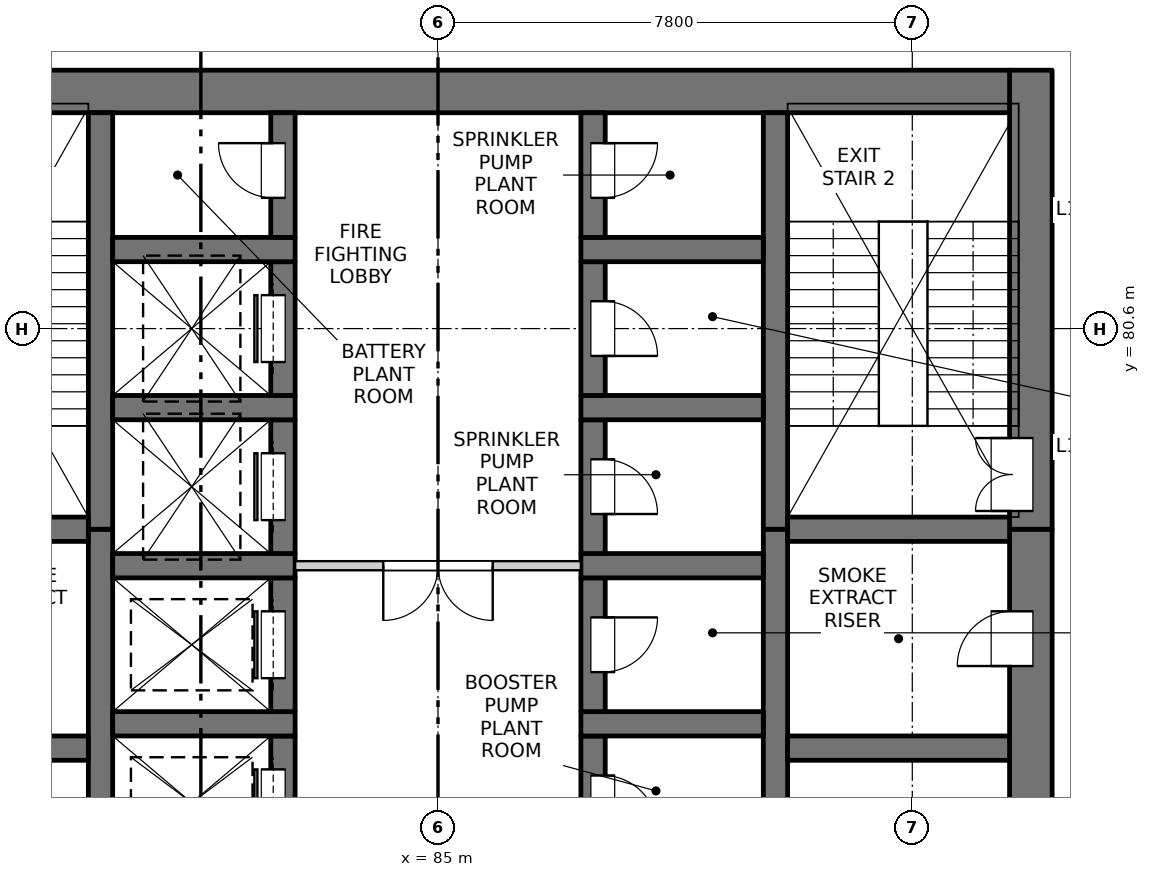
"""IFC4 building model, lengths in metres.
Left out: names, types, materials, properties, quantities, classifications, styles, units other than length and angle.
Written with IfcOpenShell. Run it as: python <this file> out.ifc"""

import sys

from ifc_helpers import new_model, si_unit, direction, frame, frame_2d, origin, place, context, subcontext, project, spatial, rectangle, extrude, element, fill, save


model = new_model("IFC4")
c1 = context("Model", 3, precision=1e-05, world=origin(), true_north=direction((0.0, 1.0)))
c2 = subcontext(c1, "Body", "Model", "MODEL_VIEW")
j1 = project(units=[si_unit("LENGTHUNIT", "METRE"), si_unit("PLANEANGLEUNIT", "RADIAN")], contexts=[c1])
p1 = place(None, origin())
s1 = spatial("IfcSite", under=j1, at=p1, CompositionType="ELEMENT")
p2 = place(p1, origin())
s2 = spatial("IfcBuilding", under=s1, at=p2, CompositionType="ELEMENT")
p3 = place(p2, frame((0.0, 0.0, 46.7)))
s3 = spatial("IfcBuildingStorey", under=s2, at=p3, CompositionType="ELEMENT", Elevation=46.7)
p4 = place(p3, frame((94.75, 61.95, -0.3), z_axis=(0.0, 0.0, 1.0), x_axis=(0.0, 1.0, 0.0)))
e1 = element("IfcWall", 1, at=p4, inside=s3, PredefinedType="SOLIDWALL", context=c2, shape_type="SweptSolid", body=[
    extrude(rectangle(XDim=15.35, YDim=0.7, at=frame_2d((7.675, 0.0))), origin(), (0.0, 0.0, 1.0), 4.5),
])
p5 = place(p4, frame((0.925, 0.0, 0.3)))
e2 = element("IfcOpeningElement", 2, at=p5, cuts=e1, PredefinedType="OPENING", context=c2, shape_type="SweptSolid", body=[
    extrude(rectangle(XDim=0.9, YDim=2.1, at=frame_2d((0.45, 1.05))), frame((0.0, 0.36, 0.0), z_axis=(0.0, -1.0, 0.0), x_axis=(1.0, 0.0, 0.0)), (0.0, 0.0, 1.0), 0.72),
])
p6 = place(p4, frame((3.8, 0.0, 0.3)))
e3 = element("IfcOpeningElement", 3, at=p6, cuts=e1, PredefinedType="OPENING", context=c2, shape_type="SweptSolid", body=[
    extrude(rectangle(XDim=0.9, YDim=2.1, at=frame_2d((0.45, 1.05))), frame((0.0, 0.36, 0.0), z_axis=(0.0, -1.0, 0.0), x_axis=(1.0, 0.0, 0.0)), (0.0, 0.0, 1.0), 0.72),
])
p7 = place(p4, frame((8.3, 0.0, 0.3)))
e4 = element("IfcOpeningElement", 4, at=p7, cuts=e1, PredefinedType="OPENING", context=c2, shape_type="SweptSolid", body=[
    extrude(rectangle(XDim=0.9, YDim=2.1, at=frame_2d((0.45, 1.05))), frame((0.0, 0.36, 0.0), z_axis=(0.0, -1.0, 0.0), x_axis=(1.0, 0.0, 0.0)), (0.0, 0.0, 1.0), 0.72),
])
p8 = place(p4, frame((13.1, 0.0, 0.3)))
e5 = element("IfcOpeningElement", 5, at=p8, cuts=e1, PredefinedType="OPENING", context=c2, shape_type="SweptSolid", body=[
    extrude(rectangle(XDim=0.9, YDim=2.1, at=frame_2d((0.45, 1.05))), frame((0.0, 0.36, 0.0), z_axis=(0.0, -1.0, 0.0), x_axis=(1.0, 0.0, 0.0)), (0.0, 0.0, 1.0), 0.72),
])
p9 = place(p3, frame((94.75, 77.3, -0.3), z_axis=(0.0, 0.0, 1.0), x_axis=(0.0, 1.0, 0.0)))
e6 = element("IfcWall", 6, at=p9, inside=s3, PredefinedType="SOLIDWALL", context=c2, shape_type="SweptSolid", body=[
    extrude(rectangle(XDim=7.55, YDim=0.7, at=frame_2d((3.775, 0.0))), origin(), (0.0, 0.0, 1.0), 4.5),
])
p10 = place(p9, frame((0.3, 0.0, 0.3)))
e7 = element("IfcOpeningElement", 7, at=p10, cuts=e6, PredefinedType="OPENING", context=c2, shape_type="SweptSolid", body=[
    extrude(rectangle(XDim=1.2, YDim=2.1, at=frame_2d((0.6, 1.05))), frame((0.0, 0.36, 0.0), z_axis=(0.0, -1.0, 0.0), x_axis=(1.0, 0.0, 0.0)), (0.0, 0.0, 1.0), 0.72),
])
p11 = place(p3, frame((75.6, 84.5, -0.3), z_axis=(0.0, 0.0, 1.0), x_axis=(1.0, 0.0, 0.0)))
e8 = element("IfcWall", 8, at=p11, inside=s3, PredefinedType="SOLIDWALL", context=c2, shape_type="SweptSolid", body=[
    extrude(rectangle(XDim=18.8, YDim=0.7, at=frame_2d((9.4, 0.0))), origin(), (0.0, 0.0, 1.0), 4.5),
])
p12 = place(p3, frame((79.45, 60.9, -0.3), z_axis=(0.0, 0.0, 1.0), x_axis=(0.0, 1.0, 0.0)))
e9 = element("IfcWall", 9, at=p12, inside=s3, PredefinedType="SOLIDWALL", context=c2, shape_type="SweptSolid", body=[
    extrude(rectangle(XDim=16.4, YDim=0.4, at=frame_2d((8.2, 0.0))), origin(), (0.0, 0.0, 1.0), 4.5),
])
p13 = place(p3, frame((79.45, 77.3, -0.3), z_axis=(0.0, 0.0, 1.0), x_axis=(0.0, 1.0, 0.0)))
e10 = element("IfcWall", 10, at=p13, inside=s3, PredefinedType="SOLIDWALL", context=c2, shape_type="SweptSolid", body=[
    extrude(rectangle(XDim=6.85, YDim=0.4, at=frame_2d((3.425, 0.0))), origin(), (0.0, 0.0, 1.0), 4.5),
])
p14 = place(p3, frame((90.55, 61.95, -0.3), z_axis=(0.0, 0.0, 1.0), x_axis=(0.0, 1.0, 0.0)))
e11 = element("IfcWall", 11, at=p14, inside=s3, PredefinedType="SOLIDWALL", context=c2, shape_type="SweptSolid", body=[
    extrude(rectangle(XDim=15.35, YDim=0.4, at=frame_2d((7.675, 0.0))), origin(), (0.0, 0.0, 1.0), 4.5),
])
p15 = place(p3, frame((90.55, 77.3, -0.3), z_axis=(0.0, 0.0, 1.0), x_axis=(0.0, 1.0, 0.0)))
e12 = element("IfcWall", 12, at=p15, inside=s3, PredefinedType="SOLIDWALL", context=c2, shape_type="SweptSolid", body=[
    extrude(rectangle(XDim=6.85, YDim=0.4, at=frame_2d((3.425, 0.0))), origin(), (0.0, 0.0, 1.0), 4.5),
])
p16 = place(p3, frame((82.45, 71.7, -0.3), z_axis=(0.0, 0.0, 1.0), x_axis=(0.0, 1.0, 0.0)))
e13 = element("IfcWall", 13, at=p16, inside=s3, PredefinedType="SOLIDWALL", context=c2, shape_type="SweptSolid", body=[
    extrude(rectangle(XDim=2.2, YDim=0.4, at=frame_2d((1.1, 0.0))), origin(), (0.0, 0.0, 1.0), 4.5),
])
p17 = place(p16, frame((0.55, 0.0, 0.3)))
e14 = element("IfcOpeningElement", 14, at=p17, cuts=e13, PredefinedType="OPENING", context=c2, shape_type="SweptSolid", body=[
    extrude(rectangle(XDim=1.1, YDim=2.1, at=frame_2d((0.55, 1.05))), frame((0.0, 0.21, 0.0), z_axis=(0.0, -1.0, 0.0), x_axis=(1.0, 0.0, 0.0)), (0.0, 0.0, 1.0), 0.42),
])
p18 = place(p3, frame((79.65, 74.1, -0.3), z_axis=(0.0, 0.0, 1.0), x_axis=(1.0, 0.0, 0.0)))
e15 = element("IfcWall", 15, at=p18, inside=s3, PredefinedType="SOLIDWALL", context=c2, shape_type="SweptSolid", body=[
    extrude(rectangle(XDim=3.0, YDim=0.4, at=frame_2d((1.5, 0.0))), origin(), (0.0, 0.0, 1.0), 4.5),
])
p19 = place(p3, frame((82.45, 74.3, -0.3), z_axis=(0.0, 0.0, 1.0), x_axis=(0.0, 1.0, 0.0)))
e16 = element("IfcWall", 16, at=p19, inside=s3, PredefinedType="SOLIDWALL", context=c2, shape_type="SweptSolid", body=[
    extrude(rectangle(XDim=2.2, YDim=0.4, at=frame_2d((1.1, 0.0))), origin(), (0.0, 0.0, 1.0), 4.5),
])
p20 = place(p19, frame((0.55, 0.0, 0.3)))
e17 = element("IfcOpeningElement", 17, at=p20, cuts=e16, PredefinedType="OPENING", context=c2, shape_type="SweptSolid", body=[
    extrude(rectangle(XDim=1.1, YDim=2.1, at=frame_2d((0.55, 1.05))), frame((0.0, 0.21, 0.0), z_axis=(0.0, -1.0, 0.0), x_axis=(1.0, 0.0, 0.0)), (0.0, 0.0, 1.0), 0.42),
])
p21 = place(p3, frame((79.65, 76.7, -0.3), z_axis=(0.0, 0.0, 1.0), x_axis=(1.0, 0.0, 0.0)))
e18 = element("IfcWall", 18, at=p21, inside=s3, PredefinedType="SOLIDWALL", context=c2, shape_type="SweptSolid", body=[
    extrude(rectangle(XDim=3.0, YDim=0.4, at=frame_2d((1.5, 0.0))), origin(), (0.0, 0.0, 1.0), 4.5),
])
p22 = place(p3, frame((82.45, 76.9, -0.3), z_axis=(0.0, 0.0, 1.0), x_axis=(0.0, 1.0, 0.0)))
e19 = element("IfcWall", 19, at=p22, inside=s3, PredefinedType="SOLIDWALL", context=c2, shape_type="SweptSolid", body=[
    extrude(rectangle(XDim=2.2, YDim=0.4, at=frame_2d((1.1, 0.0))), origin(), (0.0, 0.0, 1.0), 4.5),
])
p23 = place(p22, frame((0.55, 0.0, 0.3)))
e20 = element("IfcOpeningElement", 20, at=p23, cuts=e19, PredefinedType="OPENING", context=c2, shape_type="SweptSolid", body=[
    extrude(rectangle(XDim=1.1, YDim=2.1, at=frame_2d((0.55, 1.05))), frame((0.0, 0.21, 0.0), z_axis=(0.0, -1.0, 0.0), x_axis=(1.0, 0.0, 0.0)), (0.0, 0.0, 1.0), 0.42),
])
p24 = place(p3, frame((79.65, 79.3, -0.3), z_axis=(0.0, 0.0, 1.0), x_axis=(1.0, 0.0, 0.0)))
e21 = element("IfcWall", 21, at=p24, inside=s3, PredefinedType="SOLIDWALL", context=c2, shape_type="SweptSolid", body=[
    extrude(rectangle(XDim=3.0, YDim=0.4, at=frame_2d((1.5, 0.0))), origin(), (0.0, 0.0, 1.0), 4.5),
])
p25 = place(p3, frame((82.45, 79.5, -0.3), z_axis=(0.0, 0.0, 1.0), x_axis=(0.0, 1.0, 0.0)))
e22 = element("IfcWall", 22, at=p25, inside=s3, PredefinedType="SOLIDWALL", context=c2, shape_type="SweptSolid", body=[
    extrude(rectangle(XDim=2.2, YDim=0.4, at=frame_2d((1.1, 0.0))), origin(), (0.0, 0.0, 1.0), 4.5),
])
p26 = place(p25, frame((0.55, 0.0, 0.3)))
e23 = element("IfcOpeningElement", 23, at=p26, cuts=e22, PredefinedType="OPENING", context=c2, shape_type="SweptSolid", body=[
    extrude(rectangle(XDim=1.1, YDim=2.1, at=frame_2d((0.55, 1.05))), frame((0.0, 0.21, 0.0), z_axis=(0.0, -1.0, 0.0), x_axis=(1.0, 0.0, 0.0)), (0.0, 0.0, 1.0), 0.42),
])
p27 = place(p3, frame((79.65, 81.9, -0.3), z_axis=(0.0, 0.0, 1.0), x_axis=(1.0, 0.0, 0.0)))
e24 = element("IfcWall", 24, at=p27, inside=s3, PredefinedType="SOLIDWALL", context=c2, shape_type="SweptSolid", body=[
    extrude(rectangle(XDim=3.0, YDim=0.4, at=frame_2d((1.5, 0.0))), origin(), (0.0, 0.0, 1.0), 4.5),
])
p28 = place(p3, frame((82.45, 82.1, -0.3), z_axis=(0.0, 0.0, 1.0), x_axis=(0.0, 1.0, 0.0)))
e25 = element("IfcWall", 25, at=p28, inside=s3, PredefinedType="SOLIDWALL", context=c2, shape_type="SweptSolid", body=[
    extrude(rectangle(XDim=2.05, YDim=0.4, at=frame_2d((1.025, 0.0))), origin(), (0.0, 0.0, 1.0), 4.5),
])
p29 = place(p28, frame((0.65, 0.0, 0.3)))
e26 = element("IfcOpeningElement", 26, at=p29, cuts=e25, PredefinedType="OPENING", context=c2, shape_type="SweptSolid", body=[
    extrude(rectangle(XDim=0.9, YDim=2.1, at=frame_2d((0.45, 1.05))), frame((0.0, 0.21, 0.0), z_axis=(0.0, -1.0, 0.0), x_axis=(1.0, 0.0, 0.0)), (0.0, 0.0, 1.0), 0.42),
])
p30 = place(p3, frame((87.55, 71.7, -0.3), z_axis=(0.0, 0.0, 1.0), x_axis=(0.0, 1.0, 0.0)))
e27 = element("IfcWall", 27, at=p30, inside=s3, PredefinedType="SOLIDWALL", context=c2, shape_type="SweptSolid", body=[
    extrude(rectangle(XDim=2.2, YDim=0.4, at=frame_2d((1.1, 0.0))), origin(), (0.0, 0.0, 1.0), 4.5),
])
p31 = place(p30, frame((0.65, 0.0, 0.3)))
e28 = element("IfcOpeningElement", 28, at=p31, cuts=e27, PredefinedType="OPENING", context=c2, shape_type="SweptSolid", body=[
    extrude(rectangle(XDim=0.9, YDim=2.1, at=frame_2d((0.45, 1.05))), frame((0.0, 0.21, 0.0), z_axis=(0.0, -1.0, 0.0), x_axis=(1.0, 0.0, 0.0)), (0.0, 0.0, 1.0), 0.42),
])
p32 = place(p3, frame((87.35, 74.1, -0.3), z_axis=(0.0, 0.0, 1.0), x_axis=(1.0, 0.0, 0.0)))
e29 = element("IfcWall", 29, at=p32, inside=s3, PredefinedType="SOLIDWALL", context=c2, shape_type="SweptSolid", body=[
    extrude(rectangle(XDim=3.0, YDim=0.4, at=frame_2d((1.5, 0.0))), origin(), (0.0, 0.0, 1.0), 4.5),
])
p33 = place(p3, frame((87.55, 74.3, -0.3), z_axis=(0.0, 0.0, 1.0), x_axis=(0.0, 1.0, 0.0)))
e30 = element("IfcWall", 30, at=p33, inside=s3, PredefinedType="SOLIDWALL", context=c2, shape_type="SweptSolid", body=[
    extrude(rectangle(XDim=2.2, YDim=0.4, at=frame_2d((1.1, 0.0))), origin(), (0.0, 0.0, 1.0), 4.5),
])
p34 = place(p33, frame((0.65, 0.0, 0.3)))
e31 = element("IfcOpeningElement", 31, at=p34, cuts=e30, PredefinedType="OPENING", context=c2, shape_type="SweptSolid", body=[
    extrude(rectangle(XDim=0.9, YDim=2.1, at=frame_2d((0.45, 1.05))), frame((0.0, 0.21, 0.0), z_axis=(0.0, -1.0, 0.0), x_axis=(1.0, 0.0, 0.0)), (0.0, 0.0, 1.0), 0.42),
])
p35 = place(p3, frame((87.35, 76.7, -0.3), z_axis=(0.0, 0.0, 1.0), x_axis=(1.0, 0.0, 0.0)))
e32 = element("IfcWall", 32, at=p35, inside=s3, PredefinedType="SOLIDWALL", context=c2, shape_type="SweptSolid", body=[
    extrude(rectangle(XDim=3.0, YDim=0.4, at=frame_2d((1.5, 0.0))), origin(), (0.0, 0.0, 1.0), 4.5),
])
p36 = place(p3, frame((87.55, 76.9, -0.3), z_axis=(0.0, 0.0, 1.0), x_axis=(0.0, 1.0, 0.0)))
e33 = element("IfcWall", 33, at=p36, inside=s3, PredefinedType="SOLIDWALL", context=c2, shape_type="SweptSolid", body=[
    extrude(rectangle(XDim=2.2, YDim=0.4, at=frame_2d((1.1, 0.0))), origin(), (0.0, 0.0, 1.0), 4.5),
])
p37 = place(p36, frame((0.65, 0.0, 0.3)))
e34 = element("IfcOpeningElement", 34, at=p37, cuts=e33, PredefinedType="OPENING", context=c2, shape_type="SweptSolid", body=[
    extrude(rectangle(XDim=0.9, YDim=2.1, at=frame_2d((0.45, 1.05))), frame((0.0, 0.21, 0.0), z_axis=(0.0, -1.0, 0.0), x_axis=(1.0, 0.0, 0.0)), (0.0, 0.0, 1.0), 0.42),
])
p38 = place(p3, frame((87.35, 79.3, -0.3), z_axis=(0.0, 0.0, 1.0), x_axis=(1.0, 0.0, 0.0)))
e35 = element("IfcWall", 35, at=p38, inside=s3, PredefinedType="SOLIDWALL", context=c2, shape_type="SweptSolid", body=[
    extrude(rectangle(XDim=3.0, YDim=0.4, at=frame_2d((1.5, 0.0))), origin(), (0.0, 0.0, 1.0), 4.5),
])
p39 = place(p3, frame((87.55, 79.5, -0.3), z_axis=(0.0, 0.0, 1.0), x_axis=(0.0, 1.0, 0.0)))
e36 = element("IfcWall", 36, at=p39, inside=s3, PredefinedType="SOLIDWALL", context=c2, shape_type="SweptSolid", body=[
    extrude(rectangle(XDim=2.2, YDim=0.4, at=frame_2d((1.1, 0.0))), origin(), (0.0, 0.0, 1.0), 4.5),
])
p40 = place(p39, frame((0.65, 0.0, 0.3)))
e37 = element("IfcOpeningElement", 37, at=p40, cuts=e36, PredefinedType="OPENING", context=c2, shape_type="SweptSolid", body=[
    extrude(rectangle(XDim=0.9, YDim=2.1, at=frame_2d((0.45, 1.05))), frame((0.0, 0.21, 0.0), z_axis=(0.0, -1.0, 0.0), x_axis=(1.0, 0.0, 0.0)), (0.0, 0.0, 1.0), 0.42),
])
p41 = place(p3, frame((87.35, 81.9, -0.3), z_axis=(0.0, 0.0, 1.0), x_axis=(1.0, 0.0, 0.0)))
e38 = element("IfcWall", 38, at=p41, inside=s3, PredefinedType="SOLIDWALL", context=c2, shape_type="SweptSolid", body=[
    extrude(rectangle(XDim=3.0, YDim=0.4, at=frame_2d((1.5, 0.0))), origin(), (0.0, 0.0, 1.0), 4.5),
])
p42 = place(p3, frame((87.55, 82.1, -0.3), z_axis=(0.0, 0.0, 1.0), x_axis=(0.0, 1.0, 0.0)))
e39 = element("IfcWall", 39, at=p42, inside=s3, PredefinedType="SOLIDWALL", context=c2, shape_type="SweptSolid", body=[
    extrude(rectangle(XDim=2.05, YDim=0.4, at=frame_2d((1.025, 0.0))), origin(), (0.0, 0.0, 1.0), 4.5),
])
p43 = place(p42, frame((0.65, 0.0, 0.3)))
e40 = element("IfcOpeningElement", 40, at=p43, cuts=e39, PredefinedType="OPENING", context=c2, shape_type="SweptSolid", body=[
    extrude(rectangle(XDim=0.9, YDim=2.1, at=frame_2d((0.45, 1.05))), frame((0.0, 0.21, 0.0), z_axis=(0.0, -1.0, 0.0), x_axis=(1.0, 0.0, 0.0)), (0.0, 0.0, 1.0), 0.42),
])
for number, where, z_axis, x_axis in (
    (41, (75.6, 73.7, -0.3), (0.0, 0.0, 1.0), (1.0, 0.0, 0.0)),
    (42, (75.6, 77.3, -0.3), (0.0, 0.0, 1.0), (1.0, 0.0, 0.0)),
    (43, (90.75, 73.7, -0.3), (0.0, 0.0, 1.0), (1.0, 0.0, 0.0)),
    (44, (90.75, 77.3, -0.3), (0.0, 0.0, 1.0), (1.0, 0.0, 0.0)),
):
    element("IfcWall", number, at=place(p3, frame(where, z_axis=z_axis, x_axis=x_axis)), inside=s3, PredefinedType="SOLIDWALL", context=c2, shape_type="SweptSolid", body=[
        extrude(rectangle(XDim=3.65, YDim=0.4, at=frame_2d((1.825, 0.0))), origin(), (0.0, 0.0, 1.0), 4.5),
    ])
p44 = place(p3, frame((82.65, 76.7, 0.0), z_axis=(0.0, 0.0, 1.0), x_axis=(1.0, 0.0, 0.0)))
e45 = element("IfcWall", 45, at=p44, inside=s3, PredefinedType="PARTITIONING", context=c2, shape_type="SweptSolid", body=[
    extrude(rectangle(XDim=4.7, YDim=0.15, at=frame_2d((2.35, 0.0))), origin(), (0.0, 0.0, 1.0), 4.2),
])
p45 = place(p44, frame((1.45, 0.0, 0.0)))
e46 = element("IfcOpeningElement", 46, at=p45, cuts=e45, PredefinedType="OPENING", context=c2, shape_type="SweptSolid", body=[
    extrude(rectangle(XDim=1.8, YDim=2.1, at=frame_2d((0.9, 1.05))), frame((0.0, 0.085, 0.0), z_axis=(0.0, -1.0, 0.0), x_axis=(1.0, 0.0, 0.0)), (0.0, 0.0, 1.0), 0.17),
])
p46 = place(p17, origin())
e47 = element("IfcDoor", 47, at=p46, inside=s3, OperationType="SLIDING_TO_LEFT", PredefinedType="DOOR", context=c2, shape_type="SweptSolid", body=[
    extrude(rectangle(XDim=1.1, YDim=2.1, at=frame_2d((0.55, 1.05))), frame((0.0, 0.185, 0.0), z_axis=(0.0, -1.0, 0.0), x_axis=(1.0, 0.0, 0.0)), (0.0, 0.0, 1.0), 0.05),
])
fill(e14, e47)
p47 = place(p31, origin())
e48 = element("IfcDoor", 48, at=p47, inside=s3, OperationType="SINGLE_SWING_RIGHT", PredefinedType="DOOR", context=c2, shape_type="SweptSolid", body=[
    extrude(rectangle(XDim=0.9, YDim=2.1, at=frame_2d((0.45, 1.05))), frame((0.0, -0.135, 0.0), z_axis=(0.0, -1.0, 0.0), x_axis=(1.0, 0.0, 0.0)), (0.0, 0.0, 1.0), 0.05),
])
fill(e28, e48)
p48 = place(p20, origin())
e49 = element("IfcDoor", 49, at=p48, inside=s3, OperationType="SLIDING_TO_LEFT", PredefinedType="DOOR", context=c2, shape_type="SweptSolid", body=[
    extrude(rectangle(XDim=1.1, YDim=2.1, at=frame_2d((0.55, 1.05))), frame((0.0, 0.185, 0.0), z_axis=(0.0, -1.0, 0.0), x_axis=(1.0, 0.0, 0.0)), (0.0, 0.0, 1.0), 0.05),
])
fill(e17, e49)
p49 = place(p34, origin())
e50 = element("IfcDoor", 50, at=p49, inside=s3, OperationType="SINGLE_SWING_LEFT", PredefinedType="DOOR", context=c2, shape_type="SweptSolid", body=[
    extrude(rectangle(XDim=0.9, YDim=2.1, at=frame_2d((0.45, 1.05))), frame((0.0, -0.135, 0.0), z_axis=(0.0, -1.0, 0.0), x_axis=(1.0, 0.0, 0.0)), (0.0, 0.0, 1.0), 0.05),
])
fill(e31, e50)
p50 = place(p8, origin())
e51 = element("IfcDoor", 51, at=p50, inside=s3, OperationType="SINGLE_SWING_LEFT", PredefinedType="DOOR", context=c2, shape_type="SweptSolid", body=[
    extrude(rectangle(XDim=0.9, YDim=2.1, at=frame_2d((0.45, 1.05))), frame((0.0, 0.335, 0.0), z_axis=(0.0, -1.0, 0.0), x_axis=(1.0, 0.0, 0.0)), (0.0, 0.0, 1.0), 0.05),
])
fill(e5, e51)
p51 = place(p45, origin())
e52 = element("IfcDoor", 52, at=p51, inside=s3, OperationType="DOUBLE_DOOR_SINGLE_SWING", PredefinedType="DOOR", context=c2, shape_type="SweptSolid", body=[
    extrude(rectangle(XDim=1.8, YDim=2.1, at=frame_2d((0.9, 1.05))), frame((0.0, 0.025, 0.0), z_axis=(0.0, -1.0, 0.0), x_axis=(1.0, 0.0, 0.0)), (0.0, 0.0, 1.0), 0.05),
])
fill(e46, e52)
p52 = place(p23, origin())
e53 = element("IfcDoor", 53, at=p52, inside=s3, OperationType="SLIDING_TO_LEFT", PredefinedType="DOOR", context=c2, shape_type="SweptSolid", body=[
    extrude(rectangle(XDim=1.1, YDim=2.1, at=frame_2d((0.55, 1.05))), frame((0.0, 0.185, 0.0), z_axis=(0.0, -1.0, 0.0), x_axis=(1.0, 0.0, 0.0)), (0.0, 0.0, 1.0), 0.05),
])
fill(e20, e53)
p53 = place(p37, origin())
e54 = element("IfcDoor", 54, at=p53, inside=s3, OperationType="SINGLE_SWING_RIGHT", PredefinedType="DOOR", context=c2, shape_type="SweptSolid", body=[
    extrude(rectangle(XDim=0.9, YDim=2.1, at=frame_2d((0.45, 1.05))), frame((0.0, -0.135, 0.0), z_axis=(0.0, -1.0, 0.0), x_axis=(1.0, 0.0, 0.0)), (0.0, 0.0, 1.0), 0.05),
])
fill(e34, e54)
p54 = place(p10, origin())
e55 = element("IfcDoor", 55, at=p54, inside=s3, OperationType="DOUBLE_DOOR_SINGLE_SWING", PredefinedType="DOOR", context=c2, shape_type="SweptSolid", body=[
    extrude(rectangle(XDim=1.2, YDim=2.1, at=frame_2d((0.6, 1.05))), frame((0.0, 0.335, 0.0), z_axis=(0.0, -1.0, 0.0), x_axis=(1.0, 0.0, 0.0)), (0.0, 0.0, 1.0), 0.05),
])
fill(e7, e55)
p55 = place(p26, origin())
e56 = element("IfcDoor", 56, at=p55, inside=s3, OperationType="SLIDING_TO_LEFT", PredefinedType="DOOR", context=c2, shape_type="SweptSolid", body=[
    extrude(rectangle(XDim=1.1, YDim=2.1, at=frame_2d((0.55, 1.05))), frame((0.0, 0.185, 0.0), z_axis=(0.0, -1.0, 0.0), x_axis=(1.0, 0.0, 0.0)), (0.0, 0.0, 1.0), 0.05),
])
fill(e23, e56)
p56 = place(p40, origin())
e57 = element("IfcDoor", 57, at=p56, inside=s3, OperationType="SINGLE_SWING_RIGHT", PredefinedType="DOOR", context=c2, shape_type="SweptSolid", body=[
    extrude(rectangle(XDim=0.9, YDim=2.1, at=frame_2d((0.45, 1.05))), frame((0.0, -0.135, 0.0), z_axis=(0.0, -1.0, 0.0), x_axis=(1.0, 0.0, 0.0)), (0.0, 0.0, 1.0), 0.05),
])
fill(e37, e57)
p57 = place(p29, origin())
e58 = element("IfcDoor", 58, at=p57, inside=s3, OperationType="SINGLE_SWING_RIGHT", PredefinedType="DOOR", context=c2, shape_type="SweptSolid", body=[
    extrude(rectangle(XDim=0.9, YDim=2.1, at=frame_2d((0.45, 1.05))), frame((0.0, 0.185, 0.0), z_axis=(0.0, -1.0, 0.0), x_axis=(1.0, 0.0, 0.0)), (0.0, 0.0, 1.0), 0.05),
])
fill(e26, e58)
p58 = place(p43, origin())
e59 = element("IfcDoor", 59, at=p58, inside=s3, OperationType="SINGLE_SWING_LEFT", PredefinedType="DOOR", context=c2, shape_type="SweptSolid", body=[
    extrude(rectangle(XDim=0.9, YDim=2.1, at=frame_2d((0.45, 1.05))), frame((0.0, -0.135, 0.0), z_axis=(0.0, -1.0, 0.0), x_axis=(1.0, 0.0, 0.0)), (0.0, 0.0, 1.0), 0.05),
])
fill(e40, e59)
save(model, sys.argv[1])
